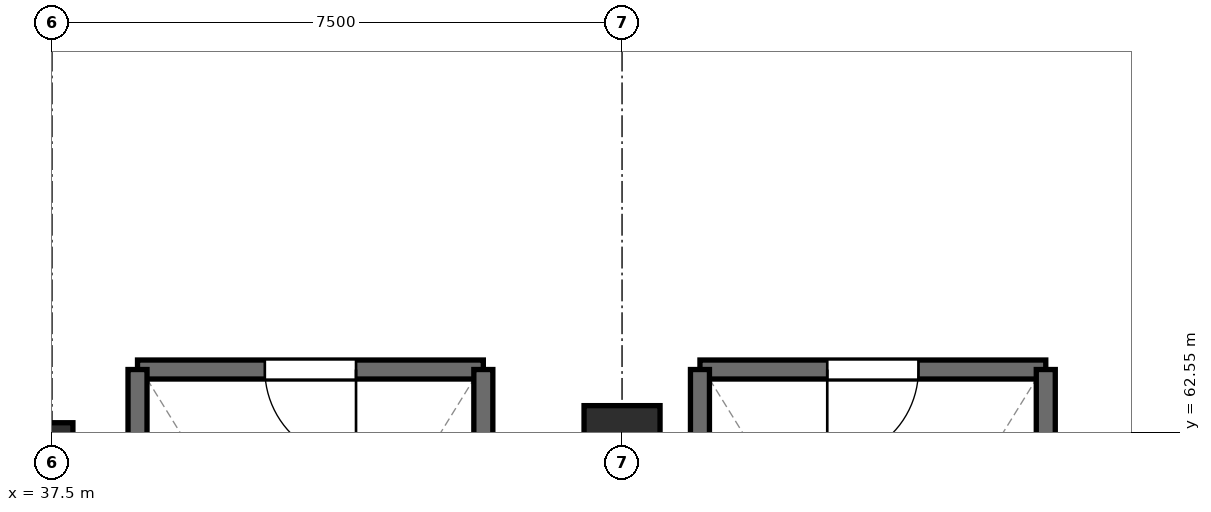
"""IFC4 building model, lengths in metres.
Left out: names, types, materials, properties, quantities, classifications, styles, units other than length and angle.
Written with IfcOpenShell. Run it as: python <this file> out.ifc"""

import sys

from ifc_helpers import new_model, si_unit, direction, frame, frame_2d, origin, origin_2d, place, context, subcontext, project, spatial, rectangle, extrude, element, fill, save


model = new_model("IFC4")
c1 = context("Model", 3, precision=1e-05, world=origin(), true_north=direction((0.0, 1.0)))
c2 = subcontext(c1, "Body", "Model", "MODEL_VIEW")
j1 = project(units=[si_unit("LENGTHUNIT", "METRE"), si_unit("PLANEANGLEUNIT", "RADIAN")], contexts=[c1])
p1 = place(None, origin())
s1 = spatial("IfcSite", under=j1, at=p1, CompositionType="ELEMENT")
p2 = place(p1, origin())
s2 = spatial("IfcBuilding", under=s1, at=p2, CompositionType="ELEMENT")
p3 = place(p2, frame((0.0, 0.0, 14.0)))
s3 = spatial("IfcBuildingStorey", under=s2, at=p3, CompositionType="ELEMENT", Elevation=14.0)
p4 = place(p3, frame((37.5, 62.4, -0.28), z_axis=(0.0, 0.0, 1.0), x_axis=(1.0, 0.0, 0.0)))
e1 = element("IfcColumn", 1, at=p4, inside=s3, PredefinedType="COLUMN", context=c2, shape_type="SweptSolid", body=[
    extrude(rectangle(XDim=0.55, YDim=0.55, at=origin_2d()), origin(), (0.0, 0.0, 1.0), 9.93),
])
p5 = place(p3, frame((45.0, 62.4, -0.28), z_axis=(0.0, 0.0, 1.0), x_axis=(1.0, 0.0, 0.0)))
e2 = element("IfcColumn", 2, at=p5, inside=s3, PredefinedType="COLUMN", context=c2, shape_type="SweptSolid", body=[
    extrude(rectangle(XDim=1.0, YDim=1.0, at=origin_2d()), origin(), (0.0, 0.0, 1.0), 9.93),
])
p6 = place(p3, frame((50.575, 63.375, 0.0), z_axis=(0.0, 0.0, 1.0), x_axis=(-1.0, 0.0, 0.0)))
e3 = element("IfcWall", 3, at=p6, inside=s3, PredefinedType="SHEAR", context=c2, shape_type="SweptSolid", body=[
    extrude(rectangle(XDim=4.55, YDim=0.25, at=frame_2d((2.275, 0.0))), origin(), (0.0, 0.0, 1.0), 9.65),
])
p7 = place(p6, frame((1.675, 0.0, 0.0)))
e4 = element("IfcOpeningElement", 4, at=p7, cuts=e3, PredefinedType="OPENING", context=c2, shape_type="SweptSolid", body=[
    extrude(rectangle(XDim=1.2, YDim=2.2, at=frame_2d((0.6, 1.1))), frame((0.0, 0.137, 0.0), z_axis=(0.0, -1.0, 0.0), x_axis=(1.0, 0.0, 0.0)), (0.0, 0.0, 1.0), 0.274),
])
for number, where, z_axis, x_axis in (
    (5, (46.025, 63.375, 0.0), (0.0, 0.0, 1.0), (0.0, -1.0, 0.0)),
    (6, (50.575, 56.175, 0.0), (0.0, 0.0, 1.0), (0.0, 1.0, 0.0)),
):
    element("IfcWall", number, at=place(p3, frame(where, z_axis=z_axis, x_axis=x_axis)), inside=s3, PredefinedType="SHEAR", context=c2, shape_type="SweptSolid", body=[
        extrude(rectangle(XDim=7.2, YDim=0.25, at=frame_2d((3.6, 0.0))), origin(), (0.0, 0.0, 1.0), 9.65),
    ])
p8 = place(p3, frame((43.175, 63.375, 0.0), z_axis=(0.0, 0.0, 1.0), x_axis=(-1.0, 0.0, 0.0)))
e7 = element("IfcWall", 7, at=p8, inside=s3, PredefinedType="SHEAR", context=c2, shape_type="SweptSolid", body=[
    extrude(rectangle(XDim=4.55, YDim=0.25, at=frame_2d((2.275, 0.0))), origin(), (0.0, 0.0, 1.0), 9.65),
])
p9 = place(p8, frame((1.675, 0.0, 0.0)))
e8 = element("IfcOpeningElement", 8, at=p9, cuts=e7, PredefinedType="OPENING", context=c2, shape_type="SweptSolid", body=[
    extrude(rectangle(XDim=1.2, YDim=2.2, at=frame_2d((0.6, 1.1))), frame((0.0, 0.137, 0.0), z_axis=(0.0, -1.0, 0.0), x_axis=(1.0, 0.0, 0.0)), (0.0, 0.0, 1.0), 0.274),
])
for number, where, z_axis, x_axis in (
    (9, (38.625, 63.375, 0.0), (0.0, 0.0, 1.0), (0.0, -1.0, 0.0)),
    (10, (43.175, 56.175, 0.0), (0.0, 0.0, 1.0), (0.0, 1.0, 0.0)),
):
    element("IfcWall", number, at=place(p3, frame(where, z_axis=z_axis, x_axis=x_axis)), inside=s3, PredefinedType="SHEAR", context=c2, shape_type="SweptSolid", body=[
        extrude(rectangle(XDim=7.2, YDim=0.25, at=frame_2d((3.6, 0.0))), origin(), (0.0, 0.0, 1.0), 9.65),
    ])
p10 = place(p7, origin())
e11 = element("IfcDoor", 11, at=p10, inside=s3, OperationType="SINGLE_SWING_RIGHT", PredefinedType="DOOR", context=c2, shape_type="SweptSolid", body=[
    extrude(rectangle(XDim=1.2, YDim=2.2, at=frame_2d((0.6, 1.1))), frame((0.0, 0.025, 0.0), z_axis=(0.0, -1.0, 0.0), x_axis=(1.0, 0.0, 0.0)), (0.0, 0.0, 1.0), 0.05),
])
fill(e4, e11)
p11 = place(p9, origin())
e12 = element("IfcDoor", 12, at=p11, inside=s3, OperationType="SINGLE_SWING_LEFT", PredefinedType="DOOR", context=c2, shape_type="SweptSolid", body=[
    extrude(rectangle(XDim=1.2, YDim=2.2, at=frame_2d((0.6, 1.1))), frame((0.0, 0.025, 0.0), z_axis=(0.0, -1.0, 0.0), x_axis=(1.0, 0.0, 0.0)), (0.0, 0.0, 1.0), 0.05),
])
fill(e8, e12)
save(model, sys.argv[1])
